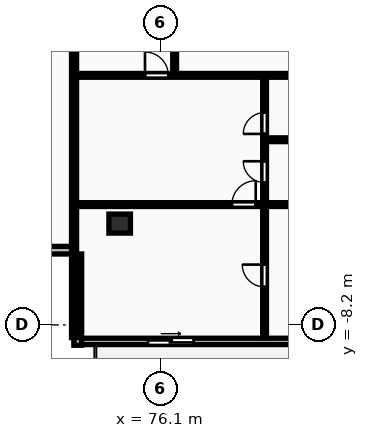
"""IFC4 building model, lengths in metres.
Left out: names, types, materials, properties, quantities, classifications, styles, units other than length and angle.
Written with IfcOpenShell. Run it as: python <this file> out.ifc"""

import sys

from ifc_helpers import new_model, si_unit, direction, frame, frame_2d, origin, origin_2d, place, context, subcontext, project, spatial, rectangle, extrude, element, fill, save


model = new_model("IFC4")
c1 = context("Model", 3, precision=1e-05, world=origin(), true_north=direction((0.0, 1.0)))
c2 = subcontext(c1, "Body", "Model", "MODEL_VIEW")
j1 = project(units=[si_unit("LENGTHUNIT", "METRE"), si_unit("PLANEANGLEUNIT", "RADIAN")], contexts=[c1])
p1 = place(None, origin())
s1 = spatial("IfcSite", under=j1, at=p1, CompositionType="ELEMENT")
p2 = place(p1, origin())
s2 = spatial("IfcBuilding", under=s1, at=p2, CompositionType="ELEMENT")
p3 = place(p2, frame((0.0, 0.0, 87.3)))
s3 = spatial("IfcBuildingStorey", under=s2, at=p3, CompositionType="ELEMENT", Elevation=87.3)
p4 = place(p3, frame((74.5, -4.2, 0.0), z_axis=(0.0, 0.0, 1.0), x_axis=(1.0, 0.0, 0.0)))
e1 = element("IfcColumn", 1, at=p4, inside=s3, PredefinedType="COLUMN", context=c2, shape_type="SweptSolid", body=[
    extrude(rectangle(XDim=0.85, YDim=0.75, at=origin_2d()), origin(), (0.0, 0.0, 1.0), 3.25),
])
p5 = place(p3, frame((72.7, -8.85, 0.0), z_axis=(0.0, 0.0, 1.0), x_axis=(1.0, 0.0, 0.0)))
e2 = element("IfcWall", 2, at=p5, inside=s3, PredefinedType="STANDARD", context=c2, shape_type="SweptSolid", body=[
    extrude(rectangle(XDim=58.0, YDim=0.25, at=frame_2d((29.0, 0.0))), origin(), (0.0, 0.0, 1.0), 2.97),
])
p6 = place(p5, frame((2.92, 0.0, 0.0)))
e3 = element("IfcOpeningElement", 3, at=p6, cuts=e2, PredefinedType="OPENING", context=c2, shape_type="SweptSolid", body=[
    extrude(rectangle(XDim=1.8, YDim=2.2, at=frame_2d((0.9, 1.1))), frame((0.0, 0.135, 0.0), z_axis=(0.0, -1.0, 0.0), x_axis=(1.0, 0.0, 0.0)), (0.0, 0.0, 1.0), 0.27),
])
p7 = place(p5, frame((9.2, 0.0, 0.85)))
e4 = element("IfcOpeningElement", 4, at=p7, cuts=e2, PredefinedType="OPENING", context=c2, shape_type="SweptSolid", body=[
    extrude(rectangle(XDim=2.4, YDim=1.9, at=frame_2d((1.2, 0.95))), frame((0.0, 0.135, 0.0), z_axis=(0.0, -1.0, 0.0), x_axis=(1.0, 0.0, 0.0)), (0.0, 0.0, 1.0), 0.27),
])
p8 = place(p5, frame((21.7, 0.0, 0.85)))
e5 = element("IfcOpeningElement", 5, at=p8, cuts=e2, PredefinedType="OPENING", context=c2, shape_type="SweptSolid", body=[
    extrude(rectangle(XDim=2.4, YDim=1.9, at=frame_2d((1.2, 0.95))), frame((0.0, 0.135, 0.0), z_axis=(0.0, -1.0, 0.0), x_axis=(1.0, 0.0, 0.0)), (0.0, 0.0, 1.0), 0.27),
])
p9 = place(p5, frame((16.0, 0.0, 0.0)))
e6 = element("IfcOpeningElement", 6, at=p9, cuts=e2, PredefinedType="OPENING", context=c2, shape_type="SweptSolid", body=[
    extrude(rectangle(XDim=1.8, YDim=2.2, at=frame_2d((0.9, 1.1))), frame((0.0, 0.135, 0.0), z_axis=(0.0, -1.0, 0.0), x_axis=(1.0, 0.0, 0.0)), (0.0, 0.0, 1.0), 0.27),
])
p10 = place(p5, frame((27.1, 0.0, 0.85)))
e7 = element("IfcOpeningElement", 7, at=p10, cuts=e2, PredefinedType="OPENING", context=c2, shape_type="SweptSolid", body=[
    extrude(rectangle(XDim=2.4, YDim=1.9, at=frame_2d((1.2, 0.95))), frame((0.0, 0.135, 0.0), z_axis=(0.0, -1.0, 0.0), x_axis=(1.0, 0.0, 0.0)), (0.0, 0.0, 1.0), 0.27),
])
p11 = place(p5, frame((35.85, 0.0, 0.0)))
e8 = element("IfcOpeningElement", 8, at=p11, cuts=e2, PredefinedType="OPENING", context=c2, shape_type="SweptSolid", body=[
    extrude(rectangle(XDim=1.8, YDim=2.2, at=frame_2d((0.9, 1.1))), frame((0.0, 0.135, 0.0), z_axis=(0.0, -1.0, 0.0), x_axis=(1.0, 0.0, 0.0)), (0.0, 0.0, 1.0), 0.27),
])
p12 = place(p5, frame((42.93, 0.0, 0.85)))
e9 = element("IfcOpeningElement", 9, at=p12, cuts=e2, PredefinedType="OPENING", context=c2, shape_type="SweptSolid", body=[
    extrude(rectangle(XDim=1.8, YDim=1.8, at=frame_2d((0.9, 0.9))), frame((0.0, 0.135, 0.0), z_axis=(0.0, -1.0, 0.0), x_axis=(1.0, 0.0, 0.0)), (0.0, 0.0, 1.0), 0.27),
])
p13 = place(p5, frame((49.12, 0.0, 0.0)))
e10 = element("IfcOpeningElement", 10, at=p13, cuts=e2, PredefinedType="OPENING", context=c2, shape_type="SweptSolid", body=[
    extrude(rectangle(XDim=1.8, YDim=2.2, at=frame_2d((0.9, 1.1))), frame((0.0, 0.135, 0.0), z_axis=(0.0, -1.0, 0.0), x_axis=(1.0, 0.0, 0.0)), (0.0, 0.0, 1.0), 0.27),
])
p14 = place(p5, frame((54.9, 0.0, 0.85)))
e11 = element("IfcOpeningElement", 11, at=p14, cuts=e2, PredefinedType="OPENING", context=c2, shape_type="SweptSolid", body=[
    extrude(rectangle(XDim=2.4, YDim=1.9, at=frame_2d((1.2, 0.95))), frame((0.0, 0.135, 0.0), z_axis=(0.0, -1.0, 0.0), x_axis=(1.0, 0.0, 0.0)), (0.0, 0.0, 1.0), 0.27),
])
p15 = place(p3, frame((69.1, -5.25, 0.0), z_axis=(0.0, 0.0, 1.0), x_axis=(1.0, 0.0, 0.0)))
e12 = element("IfcWall", 12, at=p15, inside=s3, PredefinedType="STANDARD", context=c2, shape_type="SweptSolid", body=[
    extrude(rectangle(XDim=3.6, YDim=0.3, at=frame_2d((1.8, 0.0))), origin(), (0.0, 0.0, 1.0), 2.97),
])
p16 = place(p3, frame((72.85, -5.4, 0.0), z_axis=(0.0, 0.0, 1.0), x_axis=(0.0, -1.0, 0.0)))
e13 = element("IfcWall", 13, at=p16, inside=s3, PredefinedType="STANDARD", context=c2, shape_type="SweptSolid", body=[
    extrude(rectangle(XDim=3.6, YDim=0.3, at=frame_2d((1.8, 0.0))), origin(), (0.0, 0.0, 1.0), 2.97),
])
p17 = place(p3, frame((72.7, -8.7, 0.0), z_axis=(0.0, 0.0, 1.0), x_axis=(0.0, 1.0, 0.0)))
e14 = element("IfcWall", 14, at=p17, inside=s3, PredefinedType="PARTITIONING", context=c2, shape_type="SweptSolid", body=[
    extrude(rectangle(XDim=24.87, YDim=0.2, at=frame_2d((12.435, 0.0))), origin(), (0.0, 0.0, 1.0), 2.97),
])
p18 = place(p3, frame((76.67, 1.69, 0.0), z_axis=(0.0, 0.0, 1.0), x_axis=(0.0, 1.0, 0.0)))
e15 = element("IfcWall", 15, at=p18, inside=s3, PredefinedType="PARTITIONING", context=c2, shape_type="SweptSolid", body=[
    extrude(rectangle(XDim=14.5, YDim=0.15, at=frame_2d((7.25, 0.0))), origin(), (0.0, 0.0, 1.0), 2.97),
])
p19 = place(p18, frame((2.542, 0.0, 0.0)))
e16 = element("IfcOpeningElement", 16, at=p19, cuts=e15, PredefinedType="OPENING", context=c2, shape_type="SweptSolid", body=[
    extrude(rectangle(XDim=0.88, YDim=2.06, at=frame_2d((0.44, 1.03))), frame((0.0, 0.085, 0.0), z_axis=(0.0, -1.0, 0.0), x_axis=(1.0, 0.0, 0.0)), (0.0, 0.0, 1.0), 0.17),
])
p20 = place(p3, frame((80.28, -0.89, 0.0), z_axis=(0.0, 0.0, 1.0), x_axis=(1.0, 0.0, 0.0)))
e17 = element("IfcWall", 17, at=p20, inside=s3, PredefinedType="PARTITIONING", context=c2, shape_type="SweptSolid", body=[
    extrude(rectangle(XDim=5.74, YDim=0.15, at=frame_2d((2.87, 0.0))), origin(), (0.0, 0.0, 1.0), 2.97),
])
p21 = place(p3, frame((80.22, -8.7, 0.0), z_axis=(0.0, 0.0, 1.0), x_axis=(0.0, 1.0, 0.0)))
e18 = element("IfcWall", 18, at=p21, inside=s3, PredefinedType="PARTITIONING", context=c2, shape_type="SweptSolid", body=[
    extrude(rectangle(XDim=10.31, YDim=0.15, at=frame_2d((5.155, 0.0))), origin(), (0.0, 0.0, 1.0), 2.97),
])
p22 = place(p21, frame((6.12, 0.0, 0.0)))
e19 = element("IfcOpeningElement", 19, at=p22, cuts=e18, PredefinedType="OPENING", context=c2, shape_type="SweptSolid", body=[
    extrude(rectangle(XDim=0.84, YDim=2.04, at=frame_2d((0.42, 1.02))), frame((0.0, 0.085, 0.0), z_axis=(0.0, -1.0, 0.0), x_axis=(1.0, 0.0, 0.0)), (0.0, 0.0, 1.0), 0.17),
])
p23 = place(p21, frame((8.04, 0.0, 0.0)))
e20 = element("IfcOpeningElement", 20, at=p23, cuts=e18, PredefinedType="OPENING", context=c2, shape_type="SweptSolid", body=[
    extrude(rectangle(XDim=0.84, YDim=2.04, at=frame_2d((0.42, 1.02))), frame((0.0, 0.085, 0.0), z_axis=(0.0, -1.0, 0.0), x_axis=(1.0, 0.0, 0.0)), (0.0, 0.0, 1.0), 0.17),
])
p24 = place(p21, frame((2.001, 0.0, 0.0)))
e21 = element("IfcOpeningElement", 21, at=p24, cuts=e18, PredefinedType="OPENING", context=c2, shape_type="SweptSolid", body=[
    extrude(rectangle(XDim=0.88, YDim=2.06, at=frame_2d((0.44, 1.03))), frame((0.0, 0.085, 0.0), z_axis=(0.0, -1.0, 0.0), x_axis=(1.0, 0.0, 0.0)), (0.0, 0.0, 1.0), 0.17),
])
p25 = place(p3, frame((72.78, 1.65, 0.0), z_axis=(0.0, 0.0, 1.0), x_axis=(1.0, 0.0, 0.0)))
e22 = element("IfcWall", 22, at=p25, inside=s3, PredefinedType="PARTITIONING", context=c2, shape_type="SweptSolid", body=[
    extrude(rectangle(XDim=13.24, YDim=0.15, at=frame_2d((6.62, 0.0))), origin(), (0.0, 0.0, 1.0), 2.97),
])
p26 = place(p25, frame((2.72, 0.0, 0.0)))
e23 = element("IfcOpeningElement", 23, at=p26, cuts=e22, PredefinedType="OPENING", context=c2, shape_type="SweptSolid", body=[
    extrude(rectangle(XDim=0.92, YDim=2.08, at=frame_2d((0.46, 1.04))), frame((0.0, 0.085, 0.0), z_axis=(0.0, -1.0, 0.0), x_axis=(1.0, 0.0, 0.0)), (0.0, 0.0, 1.0), 0.17),
])
p27 = place(p3, frame((72.78, -3.45, 0.0), z_axis=(0.0, 0.0, 1.0), x_axis=(1.0, 0.0, 0.0)))
e24 = element("IfcWall", 24, at=p27, inside=s3, PredefinedType="PARTITIONING", context=c2, shape_type="SweptSolid", body=[
    extrude(rectangle(XDim=13.24, YDim=0.15, at=frame_2d((6.62, 0.0))), origin(), (0.0, 0.0, 1.0), 2.97),
])
p28 = place(p27, frame((6.15, 0.0, 0.0)))
e25 = element("IfcOpeningElement", 25, at=p28, cuts=e24, PredefinedType="OPENING", context=c2, shape_type="SweptSolid", body=[
    extrude(rectangle(XDim=0.94, YDim=2.1, at=frame_2d((0.47, 1.05))), frame((0.0, 0.085, 0.0), z_axis=(0.0, -1.0, 0.0), x_axis=(1.0, 0.0, 0.0)), (0.0, 0.0, 1.0), 0.17),
])
p29 = place(p6, origin())
e26 = element("IfcDoor", 26, at=p29, inside=s3, OperationType="SLIDING_TO_RIGHT", PredefinedType="DOOR", context=c2, shape_type="SweptSolid", body=[
    extrude(rectangle(XDim=1.8, YDim=2.2, at=frame_2d((0.9, 1.1))), frame((0.0, 0.025, 0.0), z_axis=(0.0, -1.0, 0.0), x_axis=(1.0, 0.0, 0.0)), (0.0, 0.0, 1.0), 0.05),
])
fill(e3, e26)
p30 = place(p22, origin())
e27 = element("IfcDoor", 27, at=p30, inside=s3, OperationType="SINGLE_SWING_RIGHT", PredefinedType="DOOR", context=c2, shape_type="SweptSolid", body=[
    extrude(rectangle(XDim=0.84, YDim=2.04, at=frame_2d((0.42, 1.02))), frame((0.0, 0.025, 0.0), z_axis=(0.0, -1.0, 0.0), x_axis=(1.0, 0.0, 0.0)), (0.0, 0.0, 1.0), 0.05),
])
fill(e19, e27)
p31 = place(p23, origin())
e28 = element("IfcDoor", 28, at=p31, inside=s3, OperationType="SINGLE_SWING_LEFT", PredefinedType="DOOR", context=c2, shape_type="SweptSolid", body=[
    extrude(rectangle(XDim=0.84, YDim=2.04, at=frame_2d((0.42, 1.02))), frame((0.0, 0.025, 0.0), z_axis=(0.0, -1.0, 0.0), x_axis=(1.0, 0.0, 0.0)), (0.0, 0.0, 1.0), 0.05),
])
fill(e20, e28)
p32 = place(p24, origin())
e29 = element("IfcDoor", 29, at=p32, inside=s3, OperationType="SINGLE_SWING_RIGHT", PredefinedType="DOOR", context=c2, shape_type="SweptSolid", body=[
    extrude(rectangle(XDim=0.88, YDim=2.06, at=frame_2d((0.44, 1.03))), frame((0.0, 0.025, 0.0), z_axis=(0.0, -1.0, 0.0), x_axis=(1.0, 0.0, 0.0)), (0.0, 0.0, 1.0), 0.05),
])
fill(e21, e29)
p33 = place(p26, origin())
e30 = element("IfcDoor", 30, at=p33, inside=s3, OperationType="SINGLE_SWING_LEFT", PredefinedType="DOOR", context=c2, shape_type="SweptSolid", body=[
    extrude(rectangle(XDim=0.92, YDim=2.08, at=frame_2d((0.46, 1.04))), frame((0.0, 0.025, 0.0), z_axis=(0.0, -1.0, 0.0), x_axis=(1.0, 0.0, 0.0)), (0.0, 0.0, 1.0), 0.05),
])
fill(e23, e30)
p34 = place(p28, origin())
e31 = element("IfcDoor", 31, at=p34, inside=s3, OperationType="SINGLE_SWING_RIGHT", PredefinedType="DOOR", context=c2, shape_type="SweptSolid", body=[
    extrude(rectangle(XDim=0.94, YDim=2.1, at=frame_2d((0.47, 1.05))), frame((0.0, 0.025, 0.0), z_axis=(0.0, -1.0, 0.0), x_axis=(1.0, 0.0, 0.0)), (0.0, 0.0, 1.0), 0.05),
])
fill(e25, e31)
save(model, sys.argv[1])
